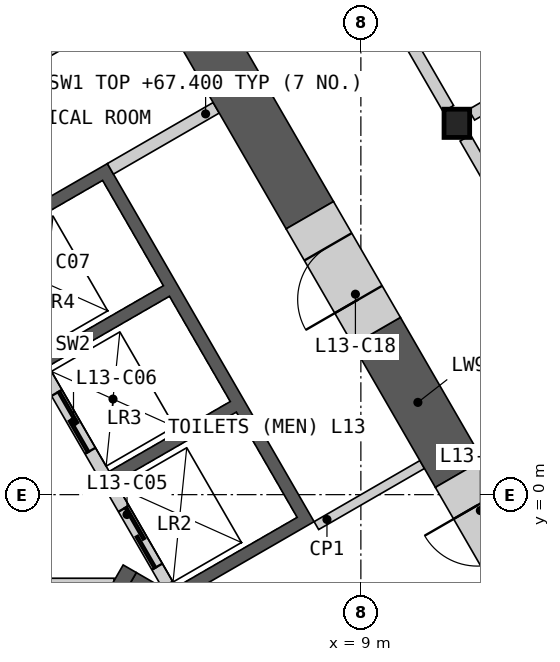
"""IFC4 building model, lengths in metres.
Left out: names, types, materials, properties, quantities, classifications, styles, units other than length and angle.
Written with IfcOpenShell. Run it as: python <this file> out.ifc"""

import sys

from ifc_helpers import new_model, si_unit, direction, frame, frame_2d, origin, origin_2d, place, context, subcontext, project, spatial, polyline, rectangle, i_section, outline, extrude, element, fill, save


model = new_model("IFC4")
c1 = context("Model", 3, precision=1e-05, world=origin(), true_north=direction((0.0, 1.0)))
c2 = subcontext(c1, "Body", "Model", "MODEL_VIEW")
j1 = project(units=[si_unit("LENGTHUNIT", "METRE"), si_unit("PLANEANGLEUNIT", "RADIAN")], contexts=[c1])
p1 = place(None, origin())
s1 = spatial("IfcSite", under=j1, at=p1, CompositionType="ELEMENT")
p2 = place(p1, origin())
s2 = spatial("IfcBuilding", under=s1, at=p2, CompositionType="ELEMENT")
p3 = place(p2, frame((0.0, 0.0, 63.6)))
s3 = spatial("IfcBuildingStorey", under=s2, at=p3, CompositionType="ELEMENT", Elevation=63.6)
p4 = place(p3, frame((10.578, 6.107, 0.0), z_axis=(0.0, 0.0, 1.0), x_axis=(1.0, 0.0, 0.0)))
e1 = element("IfcColumn", 1, at=p4, inside=s3, PredefinedType="COLUMN", context=c2, shape_type="SweptSolid", body=[
    extrude(i_section(OverallWidth=0.421, OverallDepth=0.465, WebThickness=0.045, FlangeThickness=0.072, at=origin_2d()), origin(), (0.0, 0.0, 1.0), 4.2),
])
p5 = place(p3, origin())
e2 = element("IfcWall", 2, at=p5, inside=s3, PredefinedType="SHEAR", context=c2, shape_type="SweptSolid", body=[
    extrude(outline(polyline([(2.66, 4.192), (4.831, 5.445), (8.231, -0.444), (6.061, -1.697), (5.96, -1.524), (7.952, -0.374), (6.952, 1.358), (4.96, 0.208), (4.861, 0.381), (6.852, 1.531), (5.852, 3.263), (3.861, 2.113), (3.76, 2.287), (5.752, 3.437), (4.752, 5.169), (2.76, 4.019), (2.66, 4.192)])), origin(), (0.0, 0.0, 1.0), 3.8),
])
p6 = place(p3, frame((5.817, -1.476, 0.0), z_axis=(0.0, 0.0, 1.0), x_axis=(-0.500002616675, 0.866023893041, 0.0)))
e3 = element("IfcWall", 3, at=p6, inside=s3, PredefinedType="SOLIDWALL", context=c2, shape_type="SweptSolid", body=[
    extrude(rectangle(XDim=8.373, YDim=0.2, at=frame_2d((4.187, 0.0))), origin(), (0.0, 0.0, 1.0), 3.8),
])
p7 = place(p6, frame((0.337, 0.0, 0.0)))
e4 = element("IfcOpeningElement", 4, at=p7, cuts=e3, PredefinedType="OPENING", context=c2, shape_type="SweptSolid", body=[
    extrude(rectangle(XDim=1.1, YDim=2.1, at=frame_2d((0.55, 1.05))), frame((0.0, 0.11, 0.0), z_axis=(0.0, -1.0, 0.0), x_axis=(1.0, 0.0, 0.0)), (0.0, 0.0, 1.0), 0.22),
])
p8 = place(p6, frame((2.537, 0.0, 0.0)))
e5 = element("IfcOpeningElement", 5, at=p8, cuts=e3, PredefinedType="OPENING", context=c2, shape_type="SweptSolid", body=[
    extrude(rectangle(XDim=1.1, YDim=2.1, at=frame_2d((0.55, 1.05))), frame((0.0, 0.11, 0.0), z_axis=(0.0, -1.0, 0.0), x_axis=(1.0, 0.0, 0.0)), (0.0, 0.0, 1.0), 0.22),
])
p9 = place(p6, frame((4.737, 0.0, 0.0)))
e6 = element("IfcOpeningElement", 6, at=p9, cuts=e3, PredefinedType="OPENING", context=c2, shape_type="SweptSolid", body=[
    extrude(rectangle(XDim=1.1, YDim=2.1, at=frame_2d((0.55, 1.05))), frame((0.0, 0.11, 0.0), z_axis=(0.0, -1.0, 0.0), x_axis=(1.0, 0.0, 0.0)), (0.0, 0.0, 1.0), 0.22),
])
p10 = place(p6, frame((7.037, 0.0, 0.0)))
e7 = element("IfcOpeningElement", 7, at=p10, cuts=e3, PredefinedType="OPENING", context=c2, shape_type="SweptSolid", body=[
    extrude(rectangle(XDim=0.9, YDim=2.1, at=frame_2d((0.45, 1.05))), frame((0.0, 0.11, 0.0), z_axis=(0.0, -1.0, 0.0), x_axis=(1.0, 0.0, 0.0)), (0.0, 0.0, 1.0), 0.22),
])
p11 = place(p3, frame((4.881, 5.358, 0.0), z_axis=(0.0, 0.0, 1.0), x_axis=(0.866035824272, 0.499981950752, 0.0)))
e8 = element("IfcWall", 8, at=p11, inside=s3, PredefinedType="SHEAR", context=c2, shape_type="SweptSolid", body=[
    extrude(rectangle(XDim=2.009, YDim=0.2, at=frame_2d((1.004, 0.0))), origin(), (0.0, 0.0, 1.0), 3.8),
])
p12 = place(p3, frame((3.781, 7.263, 0.0), z_axis=(0.0, 0.0, 1.0), x_axis=(0.865983199114, 0.50007309351, 0.0)))
e9 = element("IfcWall", 9, at=p12, inside=s3, PredefinedType="SHEAR", context=c2, shape_type="SweptSolid", body=[
    extrude(rectangle(XDim=2.009, YDim=0.2, at=frame_2d((1.004, 0.0))), origin(), (0.0, 0.0, 1.0), 3.8),
])
p13 = place(p3, frame((-4.941, -1.45, 0.0), z_axis=(0.0, 0.0, 1.0), x_axis=(1.0, 0.0, 0.0)))
e10 = element("IfcWall", 10, at=p13, inside=s3, PredefinedType="PARTITIONING", context=c2, shape_type="SweptSolid", body=[
    extrude(rectangle(XDim=9.882, YDim=0.15, at=frame_2d((4.941, 0.0))), origin(), (0.0, 0.0, 1.0), 3.8),
])
p14 = place(p13, frame((4.391, 0.0, 0.0)))
e11 = element("IfcOpeningElement", 11, at=p14, cuts=e10, PredefinedType="OPENING", context=c2, shape_type="SweptSolid", body=[
    extrude(rectangle(XDim=1.1, YDim=2.1, at=frame_2d((0.55, 1.05))), frame((0.0, 0.085, 0.0), z_axis=(0.0, -1.0, 0.0), x_axis=(1.0, 0.0, 0.0)), (0.0, 0.0, 1.0), 0.17),
])
p15 = place(p3, origin())
e12 = element("IfcWall", 12, at=p15, inside=s3, PredefinedType="SHEAR", context=c2, shape_type="SweptSolid", body=[
    extrude(outline(polyline([(10.032, -4.298), (10.374, -4.206), (5.307, -1.281), (5.182, -1.498), (10.032, -4.298)])), origin(), (0.0, 0.0, 1.0), 3.8),
])
p16 = place(p3, frame((3.655, -3.893, 0.0), z_axis=(0.0, 0.0, 1.0), x_axis=(0.499982516597, 0.866035497597, 0.0)))
e13 = element("IfcWall", 13, at=p16, inside=s3, PredefinedType="SHEAR", context=c2, shape_type="SweptSolid", body=[
    extrude(rectangle(XDim=3.088, YDim=0.25, at=frame_2d((1.544, 0.0))), origin(), (0.0, 0.0, 1.0), 3.8),
])
p17 = place(p16, frame((0.994, 0.0, 0.0)))
e14 = element("IfcOpeningElement", 14, at=p17, cuts=e13, PredefinedType="OPENING", context=c2, shape_type="SweptSolid", body=[
    extrude(rectangle(XDim=1.1, YDim=2.1, at=frame_2d((0.55, 1.05))), frame((0.0, 0.135, 0.0), z_axis=(0.0, -1.0, 0.0), x_axis=(1.0, 0.0, 0.0)), (0.0, 0.0, 1.0), 0.27),
])
p18 = place(p3, frame((8.268, -0.509, 0.0), z_axis=(0.0, 0.0, 1.0), x_axis=(0.866035824272, 0.499981950752, 0.0)))
e15 = element("IfcWall", 15, at=p18, inside=s3, PredefinedType="PARTITIONING", context=c2, shape_type="SweptSolid", body=[
    extrude(rectangle(XDim=2.009, YDim=0.15, at=frame_2d((1.004, 0.0))), origin(), (0.0, 0.0, 1.0), 3.8),
])
p19 = place(p3, frame((8.16, 4.596, 0.0), z_axis=(0.0, 0.0, 1.0), x_axis=(-0.500009830349, 0.866019728156, 0.0)))
e16 = element("IfcWall", 16, at=p19, inside=s3, PredefinedType="SHEAR", context=c2, shape_type="SweptSolid", body=[
    extrude(rectangle(XDim=15.541, YDim=0.9, at=frame_2d((7.771, 0.0))), origin(), (0.0, 0.0, 1.0), 3.8),
])
p20 = place(p3, frame((10.615, 0.344, 0.0), z_axis=(0.0, 0.0, 1.0), x_axis=(-0.500044870432, 0.865999496279, 0.0)))
e17 = element("IfcWall", 17, at=p20, inside=s3, PredefinedType="SHEAR", context=c2, shape_type="SweptSolid", body=[
    extrude(rectangle(XDim=2.709, YDim=0.9, at=frame_2d((1.354, 0.0))), origin(), (0.0, 0.0, 1.0), 3.8),
])
p21 = place(p3, frame((9.26, 2.691, 0.0), z_axis=(0.0, 0.0, 1.0), x_axis=(-0.499946605688, 0.86605622881, 0.0)))
e18 = element("IfcWall", 18, at=p21, inside=s3, PredefinedType="SHEAR", context=c2, shape_type="SweptSolid", body=[
    extrude(rectangle(XDim=2.2, YDim=0.9, at=frame_2d((1.1, 0.0))), origin(), (0.0, 0.0, 1.0), 3.8),
])
p22 = place(p21, frame((0.6, 0.0, 0.0)))
e19 = element("IfcOpeningElement", 19, at=p22, cuts=e18, PredefinedType="OPENING", context=c2, shape_type="SweptSolid", body=[
    extrude(rectangle(XDim=1.0, YDim=2.1, at=frame_2d((0.5, 1.05))), frame((0.0, 0.46, 0.0), z_axis=(0.0, -1.0, 0.0), x_axis=(1.0, 0.0, 0.0)), (0.0, 0.0, 1.0), 0.92),
])
p23 = place(p3, frame((11.715, -1.561, 0.0), z_axis=(0.0, 0.0, 1.0), x_axis=(-0.499946605688, 0.86605622881, 0.0)))
e20 = element("IfcWall", 20, at=p23, inside=s3, PredefinedType="SHEAR", context=c2, shape_type="SweptSolid", body=[
    extrude(rectangle(XDim=2.2, YDim=0.9, at=frame_2d((1.1, 0.0))), origin(), (0.0, 0.0, 1.0), 3.8),
])
p24 = place(p23, frame((0.6, 0.0, 0.0)))
e21 = element("IfcOpeningElement", 21, at=p24, cuts=e20, PredefinedType="OPENING", context=c2, shape_type="SweptSolid", body=[
    extrude(rectangle(XDim=1.0, YDim=2.1, at=frame_2d((0.5, 1.05))), frame((0.0, 0.46, 0.0), z_axis=(0.0, -1.0, 0.0), x_axis=(1.0, 0.0, 0.0)), (0.0, 0.0, 1.0), 0.92),
])
p25 = place(p3, frame((5.429, 15.026, 0.0), z_axis=(0.0, 0.0, 1.0), x_axis=(0.50001002959, -0.86601961312, 0.0)))
e22 = element("IfcWall", 22, at=p25, inside=s3, PredefinedType="PARTITIONING", context=c2, shape_type="SweptSolid", body=[
    extrude(rectangle(XDim=10.019, YDim=0.2, at=frame_2d((5.009, 0.0))), origin(), (0.0, 0.0, 1.0), 3.8),
])
p26 = place(p25, frame((4.059, 0.0, 0.0)))
e23 = element("IfcOpeningElement", 23, at=p26, cuts=e22, PredefinedType="OPENING", context=c2, shape_type="SweptSolid", body=[
    extrude(rectangle(XDim=1.8, YDim=2.1, at=frame_2d((0.9, 1.05))), frame((0.0, 0.11, 0.0), z_axis=(0.0, -1.0, 0.0), x_axis=(1.0, 0.0, 0.0)), (0.0, 0.0, 1.0), 0.22),
])
p27 = place(p3, frame((10.719, 5.865, 0.0), z_axis=(0.0, 0.0, 1.0), x_axis=(0.49999175339, -0.866030164915, 0.0)))
e24 = element("IfcWall", 24, at=p27, inside=s3, PredefinedType="PARTITIONING", context=c2, shape_type="SweptSolid", body=[
    extrude(rectangle(XDim=10.019, YDim=0.2, at=frame_2d((5.009, 0.0))), origin(), (0.0, 0.0, 1.0), 3.8),
])
p28 = place(p27, frame((4.585, 0.0, 0.0)))
e25 = element("IfcOpeningElement", 25, at=p28, cuts=e24, PredefinedType="OPENING", context=c2, shape_type="SweptSolid", body=[
    extrude(rectangle(XDim=0.95, YDim=2.1, at=frame_2d((0.475, 1.05))), frame((0.0, 0.11, 0.0), z_axis=(0.0, -1.0, 0.0), x_axis=(1.0, 0.0, 0.0)), (0.0, 0.0, 1.0), 0.22),
])
p29 = place(p3, frame((10.821, 6.247, 0.0), z_axis=(0.0, 0.0, 1.0), x_axis=(0.866026729935, 0.499997703033, 0.0)))
e26 = element("IfcWall", 26, at=p29, inside=s3, PredefinedType="PARTITIONING", context=c2, shape_type="SweptSolid", body=[
    extrude(rectangle(XDim=12.848, YDim=0.2, at=frame_2d((6.424, 0.0))), origin(), (0.0, 0.0, 1.0), 2.885),
])
p30 = place(p7, origin())
e27 = element("IfcDoor", 27, at=p30, inside=s3, OperationType="SLIDING_TO_LEFT", PredefinedType="DOOR", context=c2, shape_type="SweptSolid", body=[
    extrude(rectangle(XDim=1.1, YDim=2.1, at=frame_2d((0.55, 1.05))), frame((0.0, 0.025, 0.0), z_axis=(0.0, -1.0, 0.0), x_axis=(1.0, 0.0, 0.0)), (0.0, 0.0, 1.0), 0.05),
])
fill(e4, e27)
p31 = place(p8, origin())
e28 = element("IfcDoor", 28, at=p31, inside=s3, OperationType="SLIDING_TO_LEFT", PredefinedType="DOOR", context=c2, shape_type="SweptSolid", body=[
    extrude(rectangle(XDim=1.1, YDim=2.1, at=frame_2d((0.55, 1.05))), frame((0.0, 0.025, 0.0), z_axis=(0.0, -1.0, 0.0), x_axis=(1.0, 0.0, 0.0)), (0.0, 0.0, 1.0), 0.05),
])
fill(e5, e28)
p32 = place(p22, origin())
e29 = element("IfcDoor", 29, at=p32, inside=s3, OperationType="SINGLE_SWING_LEFT", PredefinedType="DOOR", context=c2, shape_type="SweptSolid", body=[
    extrude(rectangle(XDim=1.0, YDim=2.1, at=frame_2d((0.5, 1.05))), frame((0.0, 0.205, 0.0), z_axis=(0.0, -1.0, 0.0), x_axis=(1.0, 0.0, 0.0)), (0.0, 0.0, 1.0), 0.05),
])
fill(e19, e29)
p33 = place(p24, origin())
e30 = element("IfcDoor", 30, at=p33, inside=s3, OperationType="SINGLE_SWING_RIGHT", PredefinedType="DOOR", context=c2, shape_type="SweptSolid", body=[
    extrude(rectangle(XDim=1.0, YDim=2.1, at=frame_2d((0.5, 1.05))), frame((0.0, 0.205, 0.0), z_axis=(0.0, -1.0, 0.0), x_axis=(1.0, 0.0, 0.0)), (0.0, 0.0, 1.0), 0.05),
])
fill(e21, e30)
save(model, sys.argv[1])
